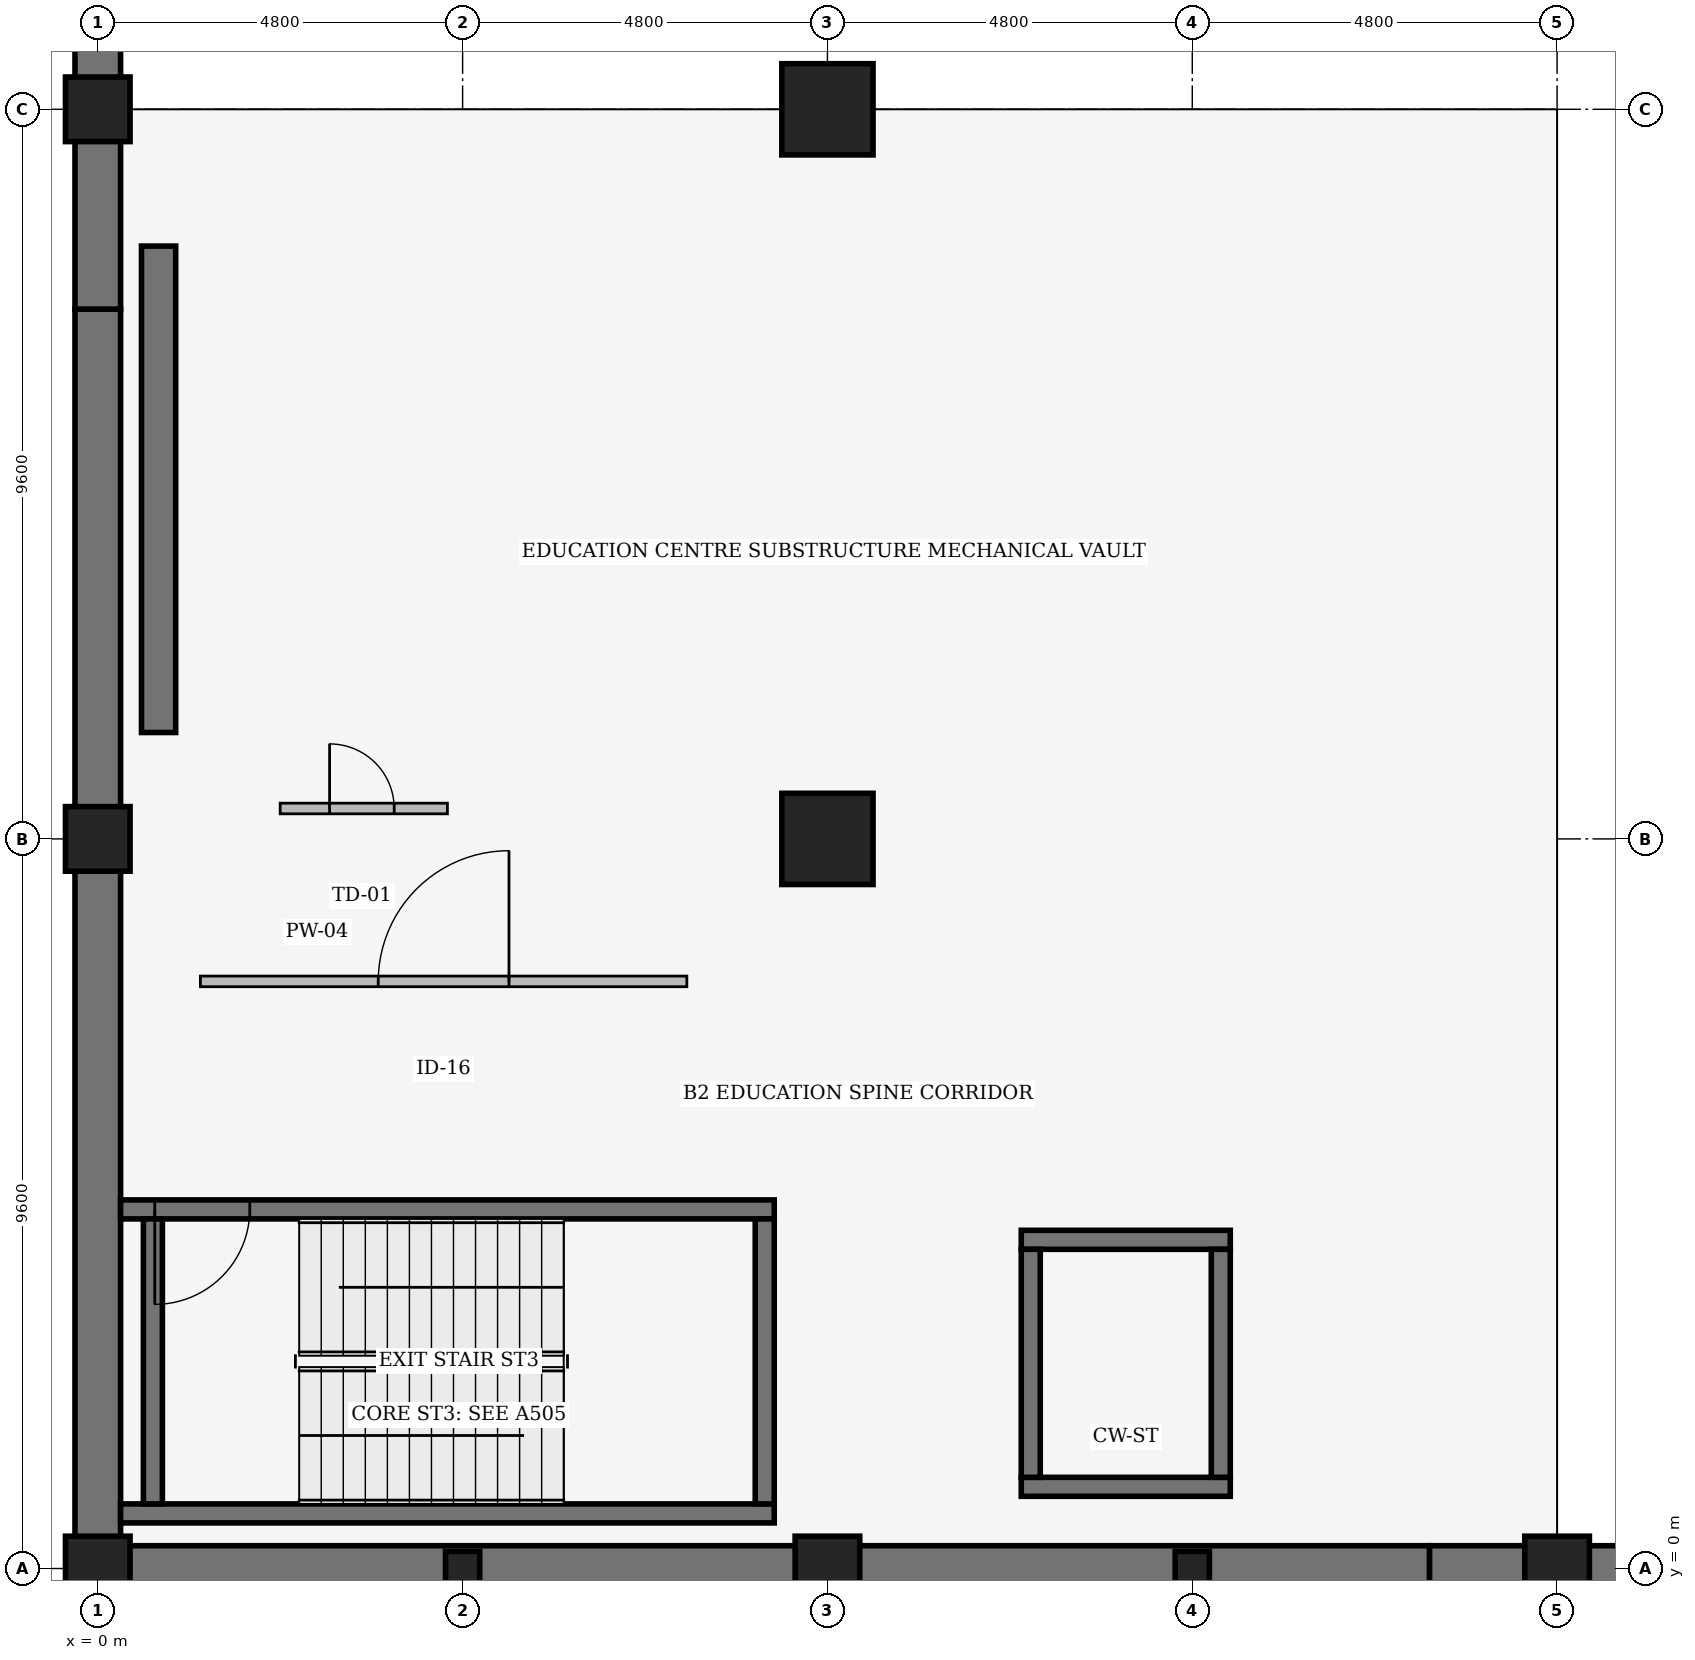
"""IFC4 building model, lengths in metres.
Left out: names, types, materials, properties, quantities, classifications, styles, units other than length and angle.
Written with IfcOpenShell. Run it as: python <this file> out.ifc"""

import sys

from ifc_helpers import new_model, si_unit, direction, frame, frame_2d, origin, origin_2d, place, context, subcontext, project, spatial, rectangle, extrude, element, fill, save


model = new_model("IFC4")
c1 = context("Model", 3, precision=1e-05, world=origin(), true_north=direction((0.0, 1.0)))
c2 = subcontext(c1, "Body", "Model", "MODEL_VIEW")
j1 = project(units=[si_unit("LENGTHUNIT", "METRE"), si_unit("PLANEANGLEUNIT", "RADIAN")], contexts=[c1])
p1 = place(None, origin())
s1 = spatial("IfcSite", under=j1, at=p1, CompositionType="ELEMENT")
p2 = place(p1, origin())
s2 = spatial("IfcBuilding", under=s1, at=p2, CompositionType="ELEMENT")
p3 = place(p2, frame((0.0, 0.0, -9.6)))
s3 = spatial("IfcBuildingStorey", under=s2, at=p3, CompositionType="ELEMENT", Elevation=-9.6)
for number, where, z_axis, x_axis in (
    (1, (0.0, 0.0, 0.0), (0.0, 0.0, 1.0), (1.0, 0.0, 0.0)),
    (2, (0.0, 9.6, 0.0), (0.0, 0.0, 1.0), (1.0, 0.0, 0.0)),
    (3, (0.0, 19.2, 0.0), (0.0, 0.0, 1.0), (1.0, 0.0, 0.0)),
    (4, (9.6, 0.0, 0.0), (0.0, 0.0, 1.0), (1.0, 0.0, 0.0)),
):
    element("IfcColumn", number, at=place(p3, frame(where, z_axis=z_axis, x_axis=x_axis)), inside=s3, PredefinedType="COLUMN", context=c2, shape_type="SweptSolid", body=[
        extrude(rectangle(XDim=0.85, YDim=0.85, at=origin_2d()), origin(), (0.0, 0.0, 1.0), 4.8),
    ])
for number, where, z_axis, x_axis in (
    (5, (9.6, 9.6, 0.0), (0.0, 0.0, 1.0), (1.0, 0.0, 0.0)),
    (6, (9.6, 19.2, 0.0), (0.0, 0.0, 1.0), (1.0, 0.0, 0.0)),
):
    element("IfcColumn", number, at=place(p3, frame(where, z_axis=z_axis, x_axis=x_axis)), inside=s3, PredefinedType="COLUMN", context=c2, shape_type="SweptSolid", body=[
        extrude(rectangle(XDim=1.2, YDim=1.2, at=origin_2d()), origin(), (0.0, 0.0, 1.0), 4.8),
    ])
p4 = place(p3, frame((19.2, 0.0, 0.0), z_axis=(0.0, 0.0, 1.0), x_axis=(1.0, 0.0, 0.0)))
e7 = element("IfcColumn", 7, at=p4, inside=s3, PredefinedType="COLUMN", context=c2, shape_type="SweptSolid", body=[
    extrude(rectangle(XDim=0.85, YDim=0.85, at=origin_2d()), origin(), (0.0, 0.0, 1.0), 4.8),
])
for number, where, z_axis, x_axis in (
    (8, (4.8, 0.0, 0.0), (0.0, 0.0, 1.0), (1.0, 0.0, 0.0)),
    (9, (14.4, 0.0, 0.0), (0.0, 0.0, 1.0), (1.0, 0.0, 0.0)),
):
    element("IfcColumn", number, at=place(p3, frame(where, z_axis=z_axis, x_axis=x_axis)), inside=s3, PredefinedType="PILASTER", context=c2, shape_type="SweptSolid", body=[
        extrude(rectangle(XDim=0.45, YDim=0.45, at=origin_2d()), origin(), (0.0, 0.0, 1.0), 4.8),
    ])
p5 = place(p3, frame((0.0, 0.28, 0.0), z_axis=(0.0, 0.0, 1.0), x_axis=(0.0, 1.0, 0.0)))
e10 = element("IfcWall", 10, at=p5, inside=s3, PredefinedType="USERDEFINED", context=c2, shape_type="SweptSolid", body=[
    extrude(rectangle(XDim=16.291, YDim=0.6, at=frame_2d((8.146, 0.0))), origin(), (0.0, 0.0, 1.0), 4.8),
])
p6 = place(p3, frame((0.0, 16.571, 0.0), z_axis=(0.0, 0.0, 1.0), x_axis=(0.0, 1.0, 0.0)))
e11 = element("IfcWall", 11, at=p6, inside=s3, PredefinedType="USERDEFINED", context=c2, shape_type="SweptSolid", body=[
    extrude(rectangle(XDim=16.572, YDim=0.6, at=frame_2d((8.286, 0.0))), origin(), (0.0, 0.0, 1.0), 4.8),
])
p7 = place(p3, frame((35.04, 0.0, 0.0), z_axis=(0.0, 0.0, 1.0), x_axis=(-1.0, 0.0, 0.0)))
e12 = element("IfcWall", 12, at=p7, inside=s3, PredefinedType="USERDEFINED", context=c2, shape_type="SweptSolid", body=[
    extrude(rectangle(XDim=17.52, YDim=0.6, at=frame_2d((8.76, 0.0))), origin(), (0.0, 0.0, 1.0), 4.8),
])
p8 = place(p3, frame((17.52, 0.0, 0.0), z_axis=(0.0, 0.0, 1.0), x_axis=(-1.0, 0.0, 0.0)))
e13 = element("IfcWall", 13, at=p8, inside=s3, PredefinedType="USERDEFINED", context=c2, shape_type="SweptSolid", body=[
    extrude(rectangle(XDim=17.24, YDim=0.6, at=frame_2d((8.62, 0.0))), origin(), (0.0, 0.0, 1.0), 4.8),
])
p9 = place(p3, frame((0.8, 11.0, 0.0), z_axis=(0.0, 0.0, 1.0), x_axis=(0.0, 1.0, 0.0)))
e14 = element("IfcWall", 14, at=p9, inside=s3, PredefinedType="SHEAR", context=c2, shape_type="SweptSolid", body=[
    extrude(rectangle(XDim=6.4, YDim=0.45, at=frame_2d((3.2, 0.0))), origin(), (0.0, 0.0, 1.0), 4.8),
])
p10 = place(p3, frame((0.3, 0.725, 0.0), z_axis=(0.0, 0.0, 1.0), x_axis=(1.0, 0.0, 0.0)))
e15 = element("IfcWall", 15, at=p10, inside=s3, PredefinedType="SHEAR", context=c2, shape_type="SweptSolid", body=[
    extrude(rectangle(XDim=8.6, YDim=0.25, at=frame_2d((4.3, 0.0))), origin(), (0.0, 0.0, 1.0), 4.45),
])
p11 = place(p3, frame((8.9, 4.725, 0.0), z_axis=(0.0, 0.0, 1.0), x_axis=(-1.0, 0.0, 0.0)))
e16 = element("IfcWall", 16, at=p11, inside=s3, PredefinedType="SHEAR", context=c2, shape_type="SweptSolid", body=[
    extrude(rectangle(XDim=8.6, YDim=0.25, at=frame_2d((4.3, 0.0))), origin(), (0.0, 0.0, 1.0), 4.45),
])
p12 = place(p11, frame((8.15, 0.0, 0.0), z_axis=(0.0, 0.0, 1.0), x_axis=(-1.0, 0.0, 0.0)))
e17 = element("IfcOpeningElement", 17, at=p12, cuts=e16, PredefinedType="OPENING", context=c2, shape_type="SweptSolid", body=[
    extrude(rectangle(XDim=1.25, YDim=2.2, at=frame_2d((0.625, 1.1))), frame((0.0, 0.135, 0.0), z_axis=(0.0, -1.0, 0.0), x_axis=(1.0, 0.0, 0.0)), (0.0, 0.0, 1.0), 0.27),
])
for number, where, z_axis, x_axis in (
    (18, (0.725, 4.6, 0.0), (0.0, 0.0, 1.0), (0.0, -1.0, 0.0)),
    (19, (8.775, 0.85, 0.0), (0.0, 0.0, 1.0), (0.0, 1.0, 0.0)),
):
    element("IfcWall", number, at=place(p3, frame(where, z_axis=z_axis, x_axis=x_axis)), inside=s3, PredefinedType="SHEAR", context=c2, shape_type="SweptSolid", body=[
        extrude(rectangle(XDim=3.75, YDim=0.25, at=frame_2d((1.875, 0.0))), origin(), (0.0, 0.0, 1.0), 4.45),
    ])
for number, where, z_axis, x_axis in (
    (20, (12.15, 1.075, 0.0), (0.0, 0.0, 1.0), (1.0, 0.0, 0.0)),
    (21, (12.15, 4.325, 0.0), (0.0, 0.0, 1.0), (1.0, 0.0, 0.0)),
):
    element("IfcWall", number, at=place(p3, frame(where, z_axis=z_axis, x_axis=x_axis)), inside=s3, PredefinedType="SHEAR", context=c2, shape_type="SweptSolid", body=[
        extrude(rectangle(XDim=2.75, YDim=0.25, at=frame_2d((1.375, 0.0))), origin(), (0.0, 0.0, 1.0), 4.45),
    ])
for number, where, z_axis, x_axis in (
    (22, (12.275, 1.2, 0.0), (0.0, 0.0, 1.0), (0.0, 1.0, 0.0)),
    (23, (14.775, 1.2, 0.0), (0.0, 0.0, 1.0), (0.0, 1.0, 0.0)),
):
    element("IfcWall", number, at=place(p3, frame(where, z_axis=z_axis, x_axis=x_axis)), inside=s3, PredefinedType="SHEAR", context=c2, shape_type="SweptSolid", body=[
        extrude(rectangle(XDim=3.0, YDim=0.25, at=frame_2d((1.5, 0.0))), origin(), (0.0, 0.0, 1.0), 4.45),
    ])
p13 = place(p3, frame((1.35, 7.725, 0.0), z_axis=(0.0, 0.0, 1.0), x_axis=(1.0, 0.0, 0.0)))
e24 = element("IfcWall", 24, at=p13, inside=s3, PredefinedType="PARTITIONING", context=c2, shape_type="SweptSolid", body=[
    extrude(rectangle(XDim=6.4, YDim=0.14, at=frame_2d((3.2, 0.0))), origin(), (0.0, 0.0, 1.0), 4.44),
])
p14 = place(p13, frame((2.34, 0.0, 0.0)))
e25 = element("IfcOpeningElement", 25, at=p14, cuts=e24, PredefinedType="OPENING", context=c2, shape_type="SweptSolid", body=[
    extrude(rectangle(XDim=1.72, YDim=2.38, at=frame_2d((0.86, 1.19))), frame((0.0, 0.08, 0.0), z_axis=(0.0, -1.0, 0.0), x_axis=(1.0, 0.0, 0.0)), (0.0, 0.0, 1.0), 0.16),
])
p15 = place(p3, frame((2.4, 10.0, 0.0), z_axis=(0.0, 0.0, 1.0), x_axis=(1.0, 0.0, 0.0)))
e26 = element("IfcWall", 26, at=p15, inside=s3, PredefinedType="PARTITIONING", context=c2, shape_type="SweptSolid", body=[
    extrude(rectangle(XDim=2.2, YDim=0.14, at=frame_2d((1.1, 0.0))), origin(), (0.0, 0.0, 1.0), 3.416),
])
p16 = place(p15, frame((0.65, 0.0, 0.0)))
e27 = element("IfcOpeningElement", 27, at=p16, cuts=e26, PredefinedType="OPENING", context=c2, shape_type="SweptSolid", body=[
    extrude(rectangle(XDim=0.85, YDim=2.05, at=frame_2d((0.425, 1.025))), frame((0.0, 0.08, 0.0), z_axis=(0.0, -1.0, 0.0), x_axis=(1.0, 0.0, 0.0)), (0.0, 0.0, 1.0), 0.16),
])
p17 = place(p12, origin())
e28 = element("IfcDoor", 28, at=p17, inside=s3, OperationType="SINGLE_SWING_LEFT", PredefinedType="DOOR", context=c2, shape_type="SweptSolid", body=[
    extrude(rectangle(XDim=1.25, YDim=2.2, at=frame_2d((0.625, 1.1))), frame((0.0, 0.025, 0.0), z_axis=(0.0, -1.0, 0.0), x_axis=(1.0, 0.0, 0.0)), (0.0, 0.0, 1.0), 0.05),
])
fill(e17, e28)
p18 = place(p14, origin())
e29 = element("IfcDoor", 29, at=p18, inside=s3, OperationType="SINGLE_SWING_RIGHT", PredefinedType="DOOR", context=c2, shape_type="SweptSolid", body=[
    extrude(rectangle(XDim=1.72, YDim=2.38, at=frame_2d((0.86, 1.19))), frame((0.0, 0.025, 0.0), z_axis=(0.0, -1.0, 0.0), x_axis=(1.0, 0.0, 0.0)), (0.0, 0.0, 1.0), 0.05),
])
fill(e25, e29)
p19 = place(p16, origin())
e30 = element("IfcDoor", 30, at=p19, inside=s3, OperationType="SINGLE_SWING_LEFT", PredefinedType="TRAPDOOR", context=c2, shape_type="SweptSolid", body=[
    extrude(rectangle(XDim=0.85, YDim=2.05, at=frame_2d((0.425, 1.025))), frame((0.0, 0.025, 0.0), z_axis=(0.0, -1.0, 0.0), x_axis=(1.0, 0.0, 0.0)), (0.0, 0.0, 1.0), 0.05),
])
fill(e27, e30)
save(model, sys.argv[1])
